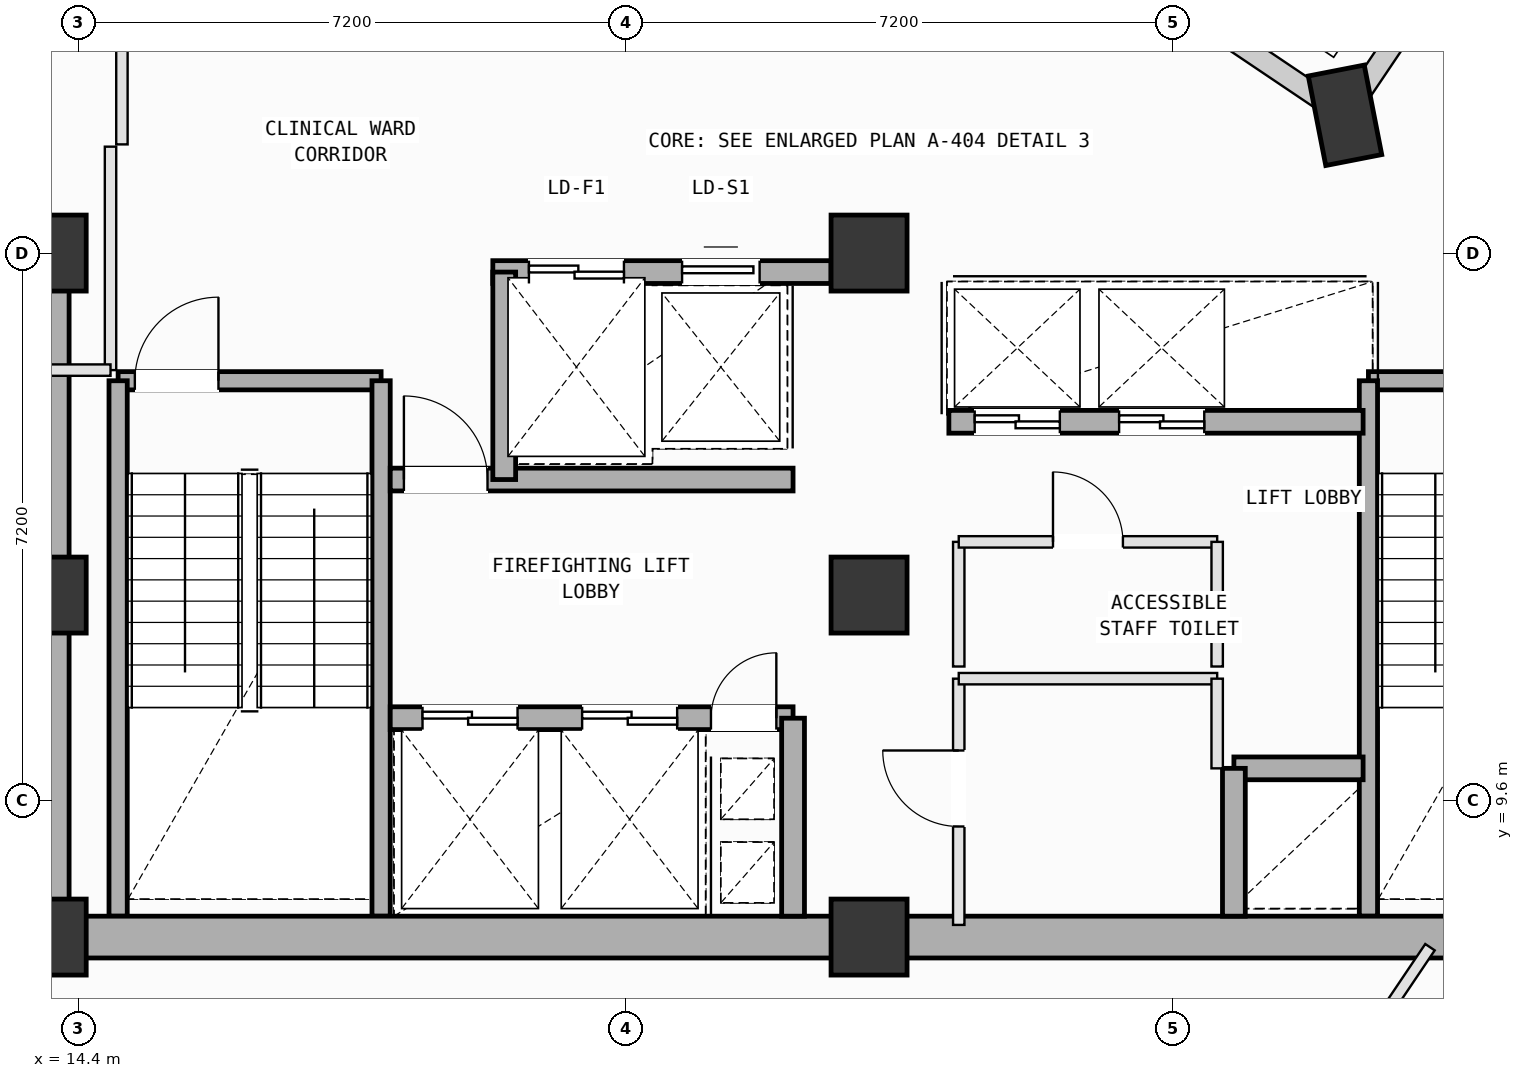
"""IFC4 building model, lengths in metres.
Left out: names, types, materials, properties, quantities, classifications, styles, units other than length and angle.
Written with IfcOpenShell. Run it as: python <this file> out.ifc"""

import sys

from ifc_helpers import new_model, si_unit, direction, frame, frame_2d, origin, origin_2d, place, context, subcontext, project, spatial, rectangle, extrude, element, fill, save


model = new_model("IFC4")
c1 = context("Model", 3, precision=1e-05, world=origin(), true_north=direction((0.0, 1.0)))
c2 = subcontext(c1, "Body", "Model", "MODEL_VIEW")
j1 = project(units=[si_unit("LENGTHUNIT", "METRE"), si_unit("PLANEANGLEUNIT", "RADIAN")], contexts=[c1])
p1 = place(None, origin())
s1 = spatial("IfcSite", under=j1, at=p1, CompositionType="ELEMENT")
p2 = place(p1, origin())
s2 = spatial("IfcBuilding", under=s1, at=p2, CompositionType="ELEMENT")
p3 = place(p2, frame((0.0, 0.0, 263.2)))
s3 = spatial("IfcBuildingStorey", under=s2, at=p3, CompositionType="ELEMENT", Elevation=263.2)
for number, where, z_axis, x_axis in (
    (1, (14.0, 7.8, 0.0), (0.0, 0.0, 1.0), (1.0, 0.0, 0.0)),
    (2, (14.0, 12.3, 0.0), (0.0, 0.0, 1.0), (1.0, 0.0, 0.0)),
    (3, (14.0, 16.8, 0.0), (0.0, 0.0, 1.0), (1.0, 0.0, 0.0)),
    (4, (24.8, 7.8, 0.0), (0.0, 0.0, 1.0), (1.0, 0.0, 0.0)),
    (5, (24.8, 12.3, 0.0), (0.0, 0.0, 1.0), (1.0, 0.0, 0.0)),
    (6, (24.8, 16.8, 0.0), (0.0, 0.0, 1.0), (1.0, 0.0, 0.0)),
):
    element("IfcColumn", number, at=place(p3, frame(where, z_axis=z_axis, x_axis=x_axis)), inside=s3, PredefinedType="COLUMN", context=c2, shape_type="SweptSolid", body=[
        extrude(rectangle(XDim=1.0, YDim=1.0, at=origin_2d()), origin(), (0.0, 0.0, 1.0), 4.0),
    ])
p4 = place(p3, frame((31.062, 18.613, 0.002), z_axis=(0.025709869991, -0.010247131953, 0.999616926063), x_axis=(-0.982326207353, 0.185195466455, 0.027163607131)))
e7 = element("IfcColumn", 7, at=p4, inside=s3, PredefinedType="COLUMN", context=c2, shape_type="SweptSolid", body=[
    extrude(rectangle(XDim=1.2, YDim=0.75, at=origin_2d()), origin(), (0.0, 0.0, 1.0), 3.979),
])
p5 = place(p3, frame((31.288, 18.949, 0.0), z_axis=(0.0, 0.0, 1.0), x_axis=(0.558472908241, 0.829522760846, 0.0)))
e8 = element("IfcWall", 8, at=p5, inside=s3, PredefinedType="SOLIDWALL", context=c2, shape_type="SweptSolid", body=[
    extrude(rectangle(XDim=6.158, YDim=0.28, at=frame_2d((3.079, 0.0))), origin(), (0.0, 0.0, 1.0), 3.185),
])
p6 = place(p5, frame((3.213, 0.0, 0.75)))
e9 = element("IfcOpeningElement", 9, at=p6, cuts=e8, PredefinedType="OPENING", context=c2, shape_type="SweptSolid", body=[
    extrude(rectangle(XDim=1.2, YDim=1.75, at=frame_2d((0.6, 0.875))), frame((0.0, 0.15, 0.0), z_axis=(0.0, -1.0, 0.0), x_axis=(1.0, 0.0, 0.0)), (0.0, 0.0, 1.0), 0.3),
])
p7 = place(p3, frame((25.005, 22.69, 0.0), z_axis=(0.0, 0.0, 1.0), x_axis=(0.829509910624, -0.558491994729, 0.0)))
e10 = element("IfcWall", 10, at=p7, inside=s3, PredefinedType="SOLIDWALL", context=c2, shape_type="SweptSolid", body=[
    extrude(rectangle(XDim=6.958, YDim=0.28, at=frame_2d((3.479, 0.0))), origin(), (0.0, 0.0, 1.0), 3.085),
])
p8 = place(p3, frame((14.92, 15.12, 0.0), z_axis=(0.0, 0.0, 1.0), x_axis=(1.0, 0.0, 0.0)))
e11 = element("IfcWall", 11, at=p8, inside=s3, PredefinedType="SOLIDWALL", context=c2, shape_type="SweptSolid", body=[
    extrude(rectangle(XDim=3.46, YDim=0.24, at=frame_2d((1.73, 0.0))), origin(), (0.0, 0.0, 1.0), 3.7),
])
p9 = place(p8, frame((0.22, 0.0, 0.0)))
e12 = element("IfcOpeningElement", 12, at=p9, cuts=e11, PredefinedType="OPENING", context=c2, shape_type="SweptSolid", body=[
    extrude(rectangle(XDim=1.1, YDim=2.15, at=frame_2d((0.55, 1.075))), frame((0.0, 0.13, 0.0), z_axis=(0.0, -1.0, 0.0), x_axis=(1.0, 0.0, 0.0)), (0.0, 0.0, 1.0), 0.26),
])
for number, where, z_axis, x_axis in (
    (13, (18.38, 15.12, 0.0), (0.0, 0.0, 1.0), (0.0, -1.0, 0.0)),
    (14, (14.92, 8.075, 0.0), (0.0, 0.0, 1.0), (0.0, 1.0, 0.0)),
):
    element("IfcWall", number, at=place(p3, frame(where, z_axis=z_axis, x_axis=x_axis)), inside=s3, PredefinedType="SOLIDWALL", context=c2, shape_type="SweptSolid", body=[
        extrude(rectangle(XDim=7.045, YDim=0.24, at=frame_2d((3.522, 0.0))), origin(), (0.0, 0.0, 1.0), 3.7),
    ])
p10 = place(p3, frame((31.37, 15.12, 0.0), z_axis=(0.0, 0.0, 1.0), x_axis=(1.0, 0.0, 0.0)))
e15 = element("IfcWall", 15, at=p10, inside=s3, PredefinedType="SOLIDWALL", context=c2, shape_type="SweptSolid", body=[
    extrude(rectangle(XDim=3.46, YDim=0.24, at=frame_2d((1.73, 0.0))), origin(), (0.0, 0.0, 1.0), 3.7),
])
p11 = place(p10, frame((2.14, 0.0, 0.0)))
e16 = element("IfcOpeningElement", 16, at=p11, cuts=e15, PredefinedType="OPENING", context=c2, shape_type="SweptSolid", body=[
    extrude(rectangle(XDim=1.1, YDim=2.15, at=frame_2d((0.55, 1.075))), frame((0.0, 0.13, 0.0), z_axis=(0.0, -1.0, 0.0), x_axis=(1.0, 0.0, 0.0)), (0.0, 0.0, 1.0), 0.26),
])
p12 = place(p3, frame((31.37, 8.075, 0.0), z_axis=(0.0, 0.0, 1.0), x_axis=(0.0, 1.0, 0.0)))
e17 = element("IfcWall", 17, at=p12, inside=s3, PredefinedType="SOLIDWALL", context=c2, shape_type="SweptSolid", body=[
    extrude(rectangle(XDim=7.045, YDim=0.24, at=frame_2d((3.522, 0.0))), origin(), (0.0, 0.0, 1.0), 3.7),
])
for number, where, z_axis, x_axis in (
    (18, (14.0, 7.8, 0.0), (0.0, 0.0, 1.0), (1.0, 0.0, 0.0)),
    (19, (24.8, 7.8, 0.0), (0.0, 0.0, 1.0), (1.0, 0.0, 0.0)),
):
    element("IfcWall", number, at=place(p3, frame(where, z_axis=z_axis, x_axis=x_axis)), inside=s3, PredefinedType="SHEAR", context=c2, shape_type="SweptSolid", body=[
        extrude(rectangle(XDim=10.8, YDim=0.55, at=frame_2d((5.4, 0.0))), origin(), (0.0, 0.0, 1.0), 3.7),
    ])
p13 = place(p3, frame((14.0, 16.8, 0.0), z_axis=(0.0, 0.0, 1.0), x_axis=(0.0, -1.0, 0.0)))
e20 = element("IfcWall", 20, at=p13, inside=s3, PredefinedType="SHEAR", context=c2, shape_type="SweptSolid", body=[
    extrude(rectangle(XDim=9.0, YDim=0.55, at=frame_2d((4.5, 0.0))), origin(), (0.0, 0.0, 1.0), 3.7),
])
p14 = place(p3, frame((19.85, 16.55, 0.0), z_axis=(0.0, 0.0, 1.0), x_axis=(1.0, 0.0, 0.0)))
e21 = element("IfcWall", 21, at=p14, inside=s3, PredefinedType="SOLIDWALL", context=c2, shape_type="SweptSolid", body=[
    extrude(rectangle(XDim=4.45, YDim=0.3, at=frame_2d((2.225, 0.0))), origin(), (0.0, 0.0, 1.0), 3.7),
])
p15 = place(p14, frame((0.475, 0.0, 0.0)))
e22 = element("IfcOpeningElement", 22, at=p15, cuts=e21, PredefinedType="OPENING", context=c2, shape_type="SweptSolid", body=[
    extrude(rectangle(XDim=1.25, YDim=2.18, at=frame_2d((0.625, 1.09))), frame((0.0, 0.16, 0.0), z_axis=(0.0, -1.0, 0.0), x_axis=(1.0, 0.0, 0.0)), (0.0, 0.0, 1.0), 0.32),
])
p16 = place(p14, frame((2.49, 0.0, 0.0)))
e23 = element("IfcOpeningElement", 23, at=p16, cuts=e21, PredefinedType="OPENING", context=c2, shape_type="SweptSolid", body=[
    extrude(rectangle(XDim=1.02, YDim=2.12, at=frame_2d((0.51, 1.06))), frame((0.0, 0.16, 0.0), z_axis=(0.0, -1.0, 0.0), x_axis=(1.0, 0.0, 0.0)), (0.0, 0.0, 1.0), 0.32),
])
p17 = place(p3, frame((18.5, 10.68, 0.0), z_axis=(0.0, 0.0, 1.0), x_axis=(1.0, 0.0, 0.0)))
e24 = element("IfcWall", 24, at=p17, inside=s3, PredefinedType="SOLIDWALL", context=c2, shape_type="SweptSolid", body=[
    extrude(rectangle(XDim=5.3, YDim=0.3, at=frame_2d((2.65, 0.0))), origin(), (0.0, 0.0, 1.0), 3.7),
])
p18 = place(p17, frame((4.22, 0.0, 0.0)))
e25 = element("IfcOpeningElement", 25, at=p18, cuts=e24, PredefinedType="OPENING", context=c2, shape_type="SweptSolid", body=[
    extrude(rectangle(XDim=0.86, YDim=2.06, at=frame_2d((0.43, 1.03))), frame((0.0, 0.16, 0.0), z_axis=(0.0, -1.0, 0.0), x_axis=(1.0, 0.0, 0.0)), (0.0, 0.0, 1.0), 0.32),
])
p19 = place(p17, frame((0.425, 0.0, 0.0)))
e26 = element("IfcOpeningElement", 26, at=p19, cuts=e24, PredefinedType="OPENING", context=c2, shape_type="SweptSolid", body=[
    extrude(rectangle(XDim=1.25, YDim=2.18, at=frame_2d((0.625, 1.09))), frame((0.0, 0.16, 0.0), z_axis=(0.0, -1.0, 0.0), x_axis=(1.0, 0.0, 0.0)), (0.0, 0.0, 1.0), 0.32),
])
p20 = place(p17, frame((2.525, 0.0, 0.0)))
e27 = element("IfcOpeningElement", 27, at=p20, cuts=e24, PredefinedType="OPENING", context=c2, shape_type="SweptSolid", body=[
    extrude(rectangle(XDim=1.25, YDim=2.18, at=frame_2d((0.625, 1.09))), frame((0.0, 0.16, 0.0), z_axis=(0.0, -1.0, 0.0), x_axis=(1.0, 0.0, 0.0)), (0.0, 0.0, 1.0), 0.32),
])
p21 = place(p3, frame((18.5, 13.82, 0.0), z_axis=(0.0, 0.0, 1.0), x_axis=(1.0, 0.0, 0.0)))
e28 = element("IfcWall", 28, at=p21, inside=s3, PredefinedType="SOLIDWALL", context=c2, shape_type="SweptSolid", body=[
    extrude(rectangle(XDim=5.3, YDim=0.3, at=frame_2d((2.65, 0.0))), origin(), (0.0, 0.0, 1.0), 3.7),
])
p22 = place(p21, frame((0.18, 0.0, 0.0)))
e29 = element("IfcOpeningElement", 29, at=p22, cuts=e28, PredefinedType="OPENING", context=c2, shape_type="SweptSolid", body=[
    extrude(rectangle(XDim=1.1, YDim=2.15, at=frame_2d((0.55, 1.075))), frame((0.0, 0.16, 0.0), z_axis=(0.0, -1.0, 0.0), x_axis=(1.0, 0.0, 0.0)), (0.0, 0.0, 1.0), 0.32),
])
p23 = place(p3, frame((23.8, 8.075, 0.0), z_axis=(0.0, 0.0, 1.0), x_axis=(0.0, 1.0, 0.0)))
e30 = element("IfcWall", 30, at=p23, inside=s3, PredefinedType="SOLIDWALL", context=c2, shape_type="SweptSolid", body=[
    extrude(rectangle(XDim=2.605, YDim=0.3, at=frame_2d((1.302, 0.0))), origin(), (0.0, 0.0, 1.0), 3.7),
])
p24 = place(p3, frame((20.0, 13.82, 0.0), z_axis=(0.0, 0.0, 1.0), x_axis=(0.0, 1.0, 0.0)))
e31 = element("IfcWall", 31, at=p24, inside=s3, PredefinedType="SOLIDWALL", context=c2, shape_type="SweptSolid", body=[
    extrude(rectangle(XDim=2.73, YDim=0.3, at=frame_2d((1.365, 0.0))), origin(), (0.0, 0.0, 1.0), 3.7),
])
p25 = place(p3, frame((29.6, 10.02, 0.0), z_axis=(0.0, 0.0, 1.0), x_axis=(1.0, 0.0, 0.0)))
e32 = element("IfcWall", 32, at=p25, inside=s3, PredefinedType="SOLIDWALL", context=c2, shape_type="SweptSolid", body=[
    extrude(rectangle(XDim=1.7, YDim=0.3, at=frame_2d((0.85, 0.0))), origin(), (0.0, 0.0, 1.0), 3.7),
])
p26 = place(p3, frame((29.6, 8.075, 0.0), z_axis=(0.0, 0.0, 1.0), x_axis=(0.0, 1.0, 0.0)))
e33 = element("IfcWall", 33, at=p26, inside=s3, PredefinedType="SOLIDWALL", context=c2, shape_type="SweptSolid", body=[
    extrude(rectangle(XDim=1.945, YDim=0.3, at=frame_2d((0.973, 0.0))), origin(), (0.0, 0.0, 1.0), 3.7),
])
p27 = place(p3, frame((25.85, 14.58, 0.0), z_axis=(0.0, 0.0, 1.0), x_axis=(1.0, 0.0, 0.0)))
e34 = element("IfcWall", 34, at=p27, inside=s3, PredefinedType="SOLIDWALL", context=c2, shape_type="SweptSolid", body=[
    extrude(rectangle(XDim=5.45, YDim=0.3, at=frame_2d((2.725, 0.0))), origin(), (0.0, 0.0, 1.0), 3.7),
])
p28 = place(p27, frame((0.34, 0.0, 0.0)))
e35 = element("IfcOpeningElement", 35, at=p28, cuts=e34, PredefinedType="OPENING", context=c2, shape_type="SweptSolid", body=[
    extrude(rectangle(XDim=1.12, YDim=2.15, at=frame_2d((0.56, 1.075))), frame((0.0, 0.16, 0.0), z_axis=(0.0, -1.0, 0.0), x_axis=(1.0, 0.0, 0.0)), (0.0, 0.0, 1.0), 0.32),
])
p29 = place(p27, frame((2.24, 0.0, 0.0)))
e36 = element("IfcOpeningElement", 36, at=p29, cuts=e34, PredefinedType="OPENING", context=c2, shape_type="SweptSolid", body=[
    extrude(rectangle(XDim=1.12, YDim=2.15, at=frame_2d((0.56, 1.075))), frame((0.0, 0.16, 0.0), z_axis=(0.0, -1.0, 0.0), x_axis=(1.0, 0.0, 0.0)), (0.0, 0.0, 1.0), 0.32),
])
p30 = place(p3, frame((25.98, 7.96, 0.0), z_axis=(0.0, 0.0, 1.0), x_axis=(0.0, 1.0, 0.0)))
e37 = element("IfcWall", 37, at=p30, inside=s3, PredefinedType="PARTITIONING", context=c2, shape_type="SweptSolid", body=[
    extrude(rectangle(XDim=3.24, YDim=0.15, at=frame_2d((1.62, 0.0))), origin(), (0.0, 0.0, 1.0), 3.7),
])
p31 = place(p30, frame((1.295, 0.0, 0.0)))
e38 = element("IfcOpeningElement", 38, at=p31, cuts=e37, PredefinedType="OPENING", context=c2, shape_type="SweptSolid", body=[
    extrude(rectangle(XDim=1.0, YDim=2.12, at=frame_2d((0.5, 1.06))), frame((0.0, 0.085, 0.0), z_axis=(0.0, -1.0, 0.0), x_axis=(1.0, 0.0, 0.0)), (0.0, 0.0, 1.0), 0.17),
])
p32 = place(p3, frame((25.98, 11.2, 0.0), z_axis=(0.0, 0.0, 1.0), x_axis=(1.0, 0.0, 0.0)))
e39 = element("IfcWall", 39, at=p32, inside=s3, PredefinedType="PARTITIONING", context=c2, shape_type="SweptSolid", body=[
    extrude(rectangle(XDim=3.4, YDim=0.15, at=frame_2d((1.7, 0.0))), origin(), (0.0, 0.0, 1.0), 3.7),
])
p33 = place(p3, frame((29.38, 11.2, 0.0), z_axis=(0.0, 0.0, 1.0), x_axis=(0.0, -1.0, 0.0)))
e40 = element("IfcWall", 40, at=p33, inside=s3, PredefinedType="PARTITIONING", context=c2, shape_type="SweptSolid", body=[
    extrude(rectangle(XDim=1.18, YDim=0.15, at=frame_2d((0.59, 0.0))), origin(), (0.0, 0.0, 1.0), 3.7),
])
p34 = place(p3, frame((25.98, 11.36, 0.0), z_axis=(0.0, 0.0, 1.0), x_axis=(0.0, 1.0, 0.0)))
e41 = element("IfcWall", 41, at=p34, inside=s3, PredefinedType="PARTITIONING", context=c2, shape_type="SweptSolid", body=[
    extrude(rectangle(XDim=1.64, YDim=0.15, at=frame_2d((0.82, 0.0))), origin(), (0.0, 0.0, 1.0), 3.7),
])
p35 = place(p3, frame((25.98, 13.0, 0.0), z_axis=(0.0, 0.0, 1.0), x_axis=(1.0, 0.0, 0.0)))
e42 = element("IfcWall", 42, at=p35, inside=s3, PredefinedType="PARTITIONING", context=c2, shape_type="SweptSolid", body=[
    extrude(rectangle(XDim=3.4, YDim=0.15, at=frame_2d((1.7, 0.0))), origin(), (0.0, 0.0, 1.0), 3.7),
])
p36 = place(p35, frame((1.24, 0.0, 0.0)))
e43 = element("IfcOpeningElement", 43, at=p36, cuts=e42, PredefinedType="OPENING", context=c2, shape_type="SweptSolid", body=[
    extrude(rectangle(XDim=0.92, YDim=2.1, at=frame_2d((0.46, 1.05))), frame((0.0, 0.085, 0.0), z_axis=(0.0, -1.0, 0.0), x_axis=(1.0, 0.0, 0.0)), (0.0, 0.0, 1.0), 0.17),
])
p37 = place(p3, frame((29.38, 13.0, 0.0), z_axis=(0.0, 0.0, 1.0), x_axis=(0.0, -1.0, 0.0)))
e44 = element("IfcWall", 44, at=p37, inside=s3, PredefinedType="PARTITIONING", context=c2, shape_type="SweptSolid", body=[
    extrude(rectangle(XDim=1.64, YDim=0.15, at=frame_2d((0.82, 0.0))), origin(), (0.0, 0.0, 1.0), 3.7),
])
p38 = place(p3, frame((32.18, 7.667, 0.0), z_axis=(0.0, 0.0, 1.0), x_axis=(-0.558473326286, -0.829522479398, 0.0)))
e45 = element("IfcWall", 45, at=p38, inside=s3, PredefinedType="PARTITIONING", context=c2, shape_type="SweptSolid", body=[
    extrude(rectangle(XDim=12.33, YDim=0.15, at=frame_2d((6.165, 0.0))), origin(), (0.0, 0.0, 1.0), 3.7),
])
p39 = place(p3, frame((14.97, 20.55, 0.0), z_axis=(0.0, 0.0, 1.0), x_axis=(0.0, -1.0, 0.0)))
e46 = element("IfcWall", 46, at=p39, inside=s3, PredefinedType="PARTITIONING", context=c2, shape_type="SweptSolid", body=[
    extrude(rectangle(XDim=2.32, YDim=0.15, at=frame_2d((1.16, 0.0))), origin(), (0.0, 0.0, 1.0), 3.7),
])
p40 = place(p3, frame((14.82, 18.2, 0.0), z_axis=(0.0, 0.0, 1.0), x_axis=(0.0, -1.0, 0.0)))
e47 = element("IfcWall", 47, at=p40, inside=s3, PredefinedType="PARTITIONING", context=c2, shape_type="SweptSolid", body=[
    extrude(rectangle(XDim=2.94, YDim=0.15, at=frame_2d((1.47, 0.0))), origin(), (0.0, 0.0, 1.0), 3.7),
])
p41 = place(p3, frame((14.82, 15.26, 0.0), z_axis=(0.0, 0.0, 1.0), x_axis=(-1.0, 0.0, 0.0)))
e48 = element("IfcWall", 48, at=p41, inside=s3, PredefinedType="PARTITIONING", context=c2, shape_type="SweptSolid", body=[
    extrude(rectangle(XDim=1.12, YDim=0.15, at=frame_2d((0.56, 0.0))), origin(), (0.0, 0.0, 1.0), 3.7),
])
p42 = place(p9, origin())
e49 = element("IfcDoor", 49, at=p42, inside=s3, OperationType="SINGLE_SWING_RIGHT", PredefinedType="DOOR", context=c2, shape_type="SweptSolid", body=[
    extrude(rectangle(XDim=1.1, YDim=2.15, at=frame_2d((0.55, 1.075))), frame((0.0, 0.025, 0.0), z_axis=(0.0, -1.0, 0.0), x_axis=(1.0, 0.0, 0.0)), (0.0, 0.0, 1.0), 0.05),
])
fill(e12, e49)
p43 = place(p18, origin())
e50 = element("IfcDoor", 50, at=p43, inside=s3, OperationType="SINGLE_SWING_RIGHT", PredefinedType="DOOR", context=c2, shape_type="SweptSolid", body=[
    extrude(rectangle(XDim=0.86, YDim=2.06, at=frame_2d((0.43, 1.03))), frame((0.0, 0.025, 0.0), z_axis=(0.0, -1.0, 0.0), x_axis=(1.0, 0.0, 0.0)), (0.0, 0.0, 1.0), 0.05),
])
fill(e25, e50)
p44 = place(p22, origin())
e51 = element("IfcDoor", 51, at=p44, inside=s3, OperationType="SINGLE_SWING_LEFT", PredefinedType="DOOR", context=c2, shape_type="SweptSolid", body=[
    extrude(rectangle(XDim=1.1, YDim=2.15, at=frame_2d((0.55, 1.075))), frame((0.0, 0.025, 0.0), z_axis=(0.0, -1.0, 0.0), x_axis=(1.0, 0.0, 0.0)), (0.0, 0.0, 1.0), 0.05),
])
fill(e29, e51)
p45 = place(p19, origin())
e52 = element("IfcDoor", 52, at=p45, inside=s3, OperationType="DOUBLE_DOOR_SLIDING", PredefinedType="DOOR", context=c2, shape_type="SweptSolid", body=[
    extrude(rectangle(XDim=1.25, YDim=2.18, at=frame_2d((0.625, 1.09))), frame((0.0, 0.025, 0.0), z_axis=(0.0, -1.0, 0.0), x_axis=(1.0, 0.0, 0.0)), (0.0, 0.0, 1.0), 0.05),
])
fill(e26, e52)
p46 = place(p20, origin())
e53 = element("IfcDoor", 53, at=p46, inside=s3, OperationType="DOUBLE_DOOR_SLIDING", PredefinedType="DOOR", context=c2, shape_type="SweptSolid", body=[
    extrude(rectangle(XDim=1.25, YDim=2.18, at=frame_2d((0.625, 1.09))), frame((0.0, 0.025, 0.0), z_axis=(0.0, -1.0, 0.0), x_axis=(1.0, 0.0, 0.0)), (0.0, 0.0, 1.0), 0.05),
])
fill(e27, e53)
p47 = place(p28, origin())
e54 = element("IfcDoor", 54, at=p47, inside=s3, OperationType="DOUBLE_DOOR_SLIDING", PredefinedType="DOOR", context=c2, shape_type="SweptSolid", body=[
    extrude(rectangle(XDim=1.12, YDim=2.15, at=frame_2d((0.56, 1.075))), frame((0.0, 0.025, 0.0), z_axis=(0.0, -1.0, 0.0), x_axis=(1.0, 0.0, 0.0)), (0.0, 0.0, 1.0), 0.05),
])
fill(e35, e54)
p48 = place(p29, origin())
e55 = element("IfcDoor", 55, at=p48, inside=s3, OperationType="DOUBLE_DOOR_SLIDING", PredefinedType="DOOR", context=c2, shape_type="SweptSolid", body=[
    extrude(rectangle(XDim=1.12, YDim=2.15, at=frame_2d((0.56, 1.075))), frame((0.0, 0.025, 0.0), z_axis=(0.0, -1.0, 0.0), x_axis=(1.0, 0.0, 0.0)), (0.0, 0.0, 1.0), 0.05),
])
fill(e36, e55)
p49 = place(p15, origin())
e56 = element("IfcDoor", 56, at=p49, inside=s3, OperationType="DOUBLE_DOOR_SLIDING", PredefinedType="DOOR", context=c2, shape_type="SweptSolid", body=[
    extrude(rectangle(XDim=1.25, YDim=2.18, at=frame_2d((0.625, 1.09))), frame((0.0, 0.025, 0.0), z_axis=(0.0, -1.0, 0.0), x_axis=(1.0, 0.0, 0.0)), (0.0, 0.0, 1.0), 0.05),
])
fill(e22, e56)
p50 = place(p16, origin())
e57 = element("IfcDoor", 57, at=p50, inside=s3, OperationType="SLIDING_TO_LEFT", PredefinedType="DOOR", context=c2, shape_type="SweptSolid", body=[
    extrude(rectangle(XDim=1.02, YDim=2.12, at=frame_2d((0.51, 1.06))), frame((0.0, 0.025, 0.0), z_axis=(0.0, -1.0, 0.0), x_axis=(1.0, 0.0, 0.0)), (0.0, 0.0, 1.0), 0.05),
])
fill(e23, e57)
p51 = place(p31, origin())
e58 = element("IfcDoor", 58, at=p51, inside=s3, OperationType="SINGLE_SWING_RIGHT", PredefinedType="DOOR", context=c2, shape_type="SweptSolid", body=[
    extrude(rectangle(XDim=1.0, YDim=2.12, at=frame_2d((0.5, 1.06))), frame((0.0, 0.025, 0.0), z_axis=(0.0, -1.0, 0.0), x_axis=(1.0, 0.0, 0.0)), (0.0, 0.0, 1.0), 0.05),
])
fill(e38, e58)
p52 = place(p36, origin())
e59 = element("IfcDoor", 59, at=p52, inside=s3, OperationType="SINGLE_SWING_LEFT", PredefinedType="DOOR", context=c2, shape_type="SweptSolid", body=[
    extrude(rectangle(XDim=0.92, YDim=2.1, at=frame_2d((0.46, 1.05))), frame((0.0, 0.025, 0.0), z_axis=(0.0, -1.0, 0.0), x_axis=(1.0, 0.0, 0.0)), (0.0, 0.0, 1.0), 0.05),
])
fill(e43, e59)
save(model, sys.argv[1])
